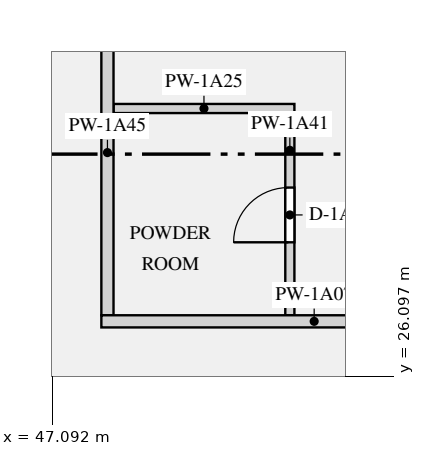
"""IFC4 building model, lengths in metres.
Left out: names, types, materials, properties, quantities, classifications, styles, units other than length and angle.
Written with IfcOpenShell. Run it as: python <this file> out.ifc"""

import sys

from ifc_helpers import new_model, si_unit, direction, frame, frame_2d, origin, place, context, subcontext, project, spatial, rectangle, extrude, element, fill, save


model = new_model("IFC4")
c1 = context("Model", 3, precision=1e-05, world=origin(), true_north=direction((0.0, 1.0)))
c2 = subcontext(c1, "Body", "Model", "MODEL_VIEW")
j1 = project(units=[si_unit("LENGTHUNIT", "METRE"), si_unit("PLANEANGLEUNIT", "RADIAN")], contexts=[c1])
p1 = place(None, origin())
s1 = spatial("IfcSite", under=j1, at=p1, CompositionType="ELEMENT")
p2 = place(p1, origin())
s2 = spatial("IfcBuilding", under=s1, at=p2, CompositionType="ELEMENT")
p3 = place(p2, frame((0.0, 0.0, 19.5)))
s3 = spatial("IfcBuildingStorey", under=s2, at=p3, CompositionType="ELEMENT", Elevation=19.5)
p4 = place(p3, frame((47.9, 27.0, 0.0), z_axis=(0.0, 0.0, 1.0), x_axis=(1.0, 0.0, 0.0)))
e1 = element("IfcWall", 1, at=p4, inside=s3, PredefinedType="PARTITIONING", context=c2, shape_type="SweptSolid", body=[
    extrude(rectangle(XDim=7.0, YDim=0.2, at=frame_2d((3.5, 0.0))), origin(), (0.0, 0.0, 1.0), 2.83),
])
p5 = place(p3, frame((48.1, 30.5, 0.0), z_axis=(0.0, 0.0, 1.0), x_axis=(1.0, 0.0, 0.0)))
e2 = element("IfcWall", 2, at=p5, inside=s3, PredefinedType="PARTITIONING", context=c2, shape_type="SweptSolid", body=[
    extrude(rectangle(XDim=2.975, YDim=0.15, at=frame_2d((1.487, 0.0))), origin(), (0.0, 0.0, 1.0), 2.83),
])
p6 = place(p3, frame((51.0, 27.1, 0.0), z_axis=(0.0, 0.0, 1.0), x_axis=(0.0, 1.0, 0.0)))
e3 = element("IfcWall", 3, at=p6, inside=s3, PredefinedType="PARTITIONING", context=c2, shape_type="SweptSolid", body=[
    extrude(rectangle(XDim=3.325, YDim=0.15, at=frame_2d((1.663, 0.0))), origin(), (0.0, 0.0, 1.0), 2.83),
])
p7 = place(p6, frame((1.2, 0.0, 0.0)))
e4 = element("IfcOpeningElement", 4, at=p7, cuts=e3, PredefinedType="OPENING", context=c2, shape_type="SweptSolid", body=[
    extrude(rectangle(XDim=0.9, YDim=2.1, at=frame_2d((0.45, 1.05))), frame((0.0, 0.085, 0.0), z_axis=(0.0, -1.0, 0.0), x_axis=(1.0, 0.0, 0.0)), (0.0, 0.0, 1.0), 0.17),
])
p8 = place(p3, frame((48.0, 27.1, 0.0), z_axis=(0.0, 0.0, 1.0), x_axis=(0.0, 1.0, 0.0)))
e5 = element("IfcWall", 5, at=p8, inside=s3, PredefinedType="PARTITIONING", context=c2, shape_type="SweptSolid", body=[
    extrude(rectangle(XDim=11.3, YDim=0.2, at=frame_2d((5.65, 0.0))), origin(), (0.0, 0.0, 1.0), 2.83),
])
p9 = place(p8, frame((5.35, 0.0, 0.0)))
e6 = element("IfcOpeningElement", 6, at=p9, cuts=e5, PredefinedType="OPENING", context=c2, shape_type="SweptSolid", body=[
    extrude(rectangle(XDim=1.1, YDim=2.1, at=frame_2d((0.55, 1.05))), frame((0.0, 0.11, 0.0), z_axis=(0.0, -1.0, 0.0), x_axis=(1.0, 0.0, 0.0)), (0.0, 0.0, 1.0), 0.22),
])
p10 = place(p7, origin())
e7 = element("IfcDoor", 7, at=p10, inside=s3, OperationType="SINGLE_SWING_LEFT", PredefinedType="DOOR", context=c2, shape_type="SweptSolid", body=[
    extrude(rectangle(XDim=0.9, YDim=2.1, at=frame_2d((0.45, 1.05))), frame((0.0, 0.025, 0.0), z_axis=(0.0, -1.0, 0.0), x_axis=(1.0, 0.0, 0.0)), (0.0, 0.0, 1.0), 0.05),
])
fill(e4, e7)
save(model, sys.argv[1])
